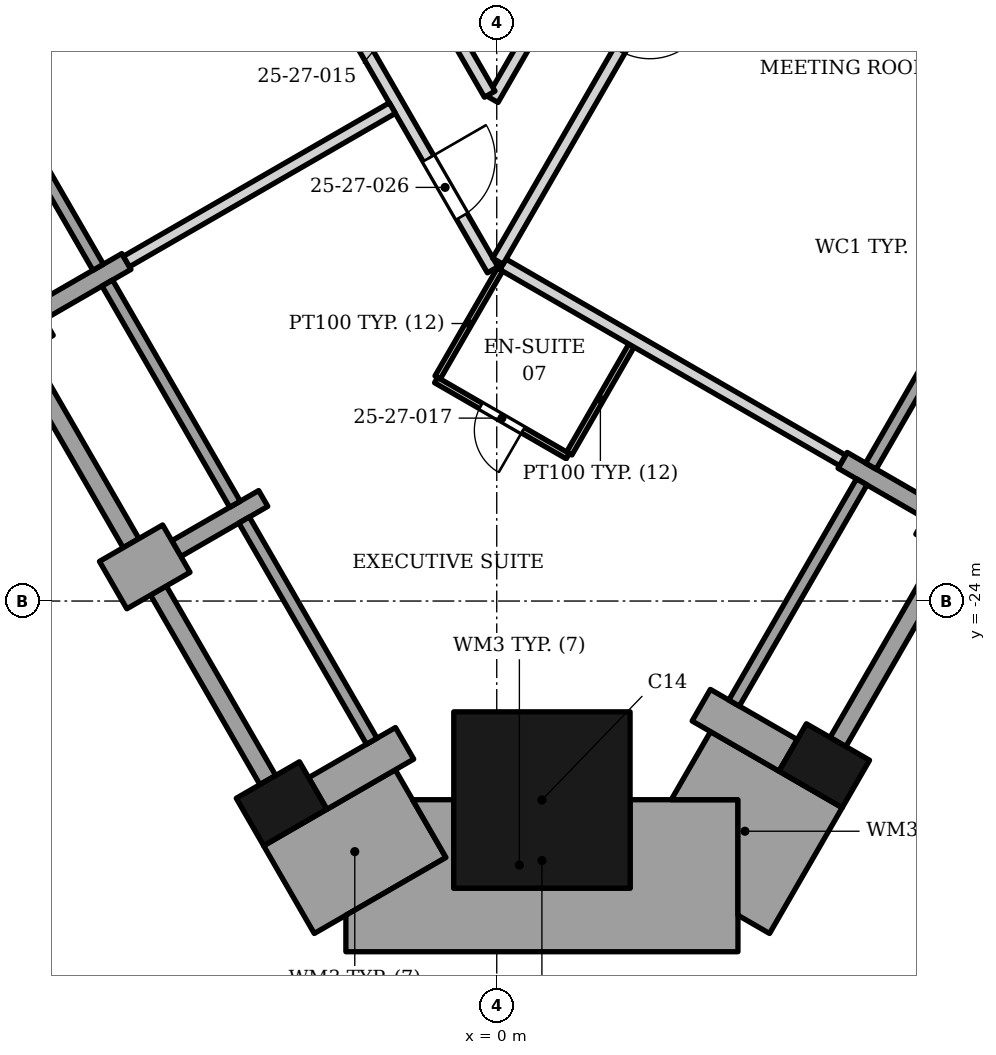
"""IFC4 building model, lengths in metres.
Left out: names, types, materials, properties, quantities, classifications, styles, units other than length and angle.
Written with IfcOpenShell. Run it as: python <this file> out.ifc"""

import sys

from ifc_helpers import new_model, si_unit, direction, frame, frame_2d, origin, origin_2d, place, context, subcontext, project, spatial, polyline, rectangle, outline, extrude, element, fill, save


model = new_model("IFC4")
c1 = context("Model", 3, precision=1e-05, world=origin(), true_north=direction((0.0, 1.0)))
c2 = subcontext(c1, "Body", "Model", "MODEL_VIEW")
j1 = project(units=[si_unit("LENGTHUNIT", "METRE"), si_unit("PLANEANGLEUNIT", "RADIAN")], contexts=[c1])
p1 = place(None, origin())
s1 = spatial("IfcSite", under=j1, at=p1, CompositionType="ELEMENT")
p2 = place(p1, origin())
s2 = spatial("IfcBuilding", under=s1, at=p2, CompositionType="ELEMENT")
p3 = place(p2, frame((0.0, 0.0, 112.2)))
s3 = spatial("IfcBuildingStorey", under=s2, at=p3, CompositionType="ELEMENT", Elevation=112.2)
p4 = place(p3, frame((0.743, -27.272, 0.0), z_axis=(0.0, 0.0, 1.0), x_axis=(0.0, 1.0, 0.0)))
e1 = element("IfcColumn", 1, at=p4, inside=s3, PredefinedType="COLUMN", context=c2, shape_type="SweptSolid", body=[
    extrude(rectangle(XDim=2.9, YDim=2.9, at=origin_2d()), origin(), (0.0, 0.0, 1.0), 3.4),
])
for number, where, z_axis, x_axis in (
    (2, (-8.039, -19.541, 0.0), (0.0, 0.0, 1.0), (0.5, -0.866, 0.0)),
    (3, (-3.539, -27.333, 0.0), (0.0, 0.0, 1.0), (0.5, -0.866, 0.0)),
    (4, (5.387, -26.708, 0.0), (0.0, 0.0, 1.0), (0.5, 0.866, 0.0)),
):
    element("IfcColumn", number, at=place(p3, frame(where, z_axis=z_axis, x_axis=x_axis)), inside=s3, PredefinedType="COLUMN", context=c2, shape_type="SweptSolid", body=[
        extrude(rectangle(XDim=0.9, YDim=1.2, at=origin_2d()), origin(), (0.0, 0.0, 1.0), 3.4),
    ])
p5 = place(p3, frame((-7.52, -19.241, 0.0), z_axis=(0.0, 0.0, 1.0), x_axis=(0.865976140824, 0.500085316245, 0.0)))
e5 = element("IfcWall", 5, at=p5, inside=s3, PredefinedType="SOLIDWALL", context=c2, shape_type="SweptSolid", body=[
    extrude(rectangle(XDim=1.65, YDim=0.3, at=frame_2d((0.825, 0.0))), origin(), (0.0, 0.0, 1.0), 2.65),
])
p6 = place(p3, frame((-6.309, -23.738, 0.0), z_axis=(0.0, 0.0, 1.0), x_axis=(0.865955154139, 0.50012165622, 0.0)))
e6 = element("IfcWall", 6, at=p6, inside=s3, PredefinedType="SOLIDWALL", context=c2, shape_type="SweptSolid", body=[
    extrude(rectangle(XDim=1.2, YDim=0.9, at=frame_2d((0.6, 0.0))), origin(), (0.0, 0.0, 1.0), 2.63),
])
p7 = place(p3, frame((-5.27, -23.138, 0.0), z_axis=(0.0, 0.0, 1.0), x_axis=(0.866040211805, 0.499974350878, 0.0)))
e7 = element("IfcWall", 7, at=p7, inside=s3, PredefinedType="SOLIDWALL", context=c2, shape_type="SweptSolid", body=[
    extrude(rectangle(XDim=1.65, YDim=0.3, at=frame_2d((0.825, 0.0))), origin(), (0.0, 0.0, 1.0), 2.628),
])
p8 = place(p3, frame((-1.515, -26.34, 0.0), z_axis=(0.0, 0.0, 1.0), x_axis=(-0.866040211805, -0.499974350878, 0.0)))
e8 = element("IfcWall", 8, at=p8, inside=s3, PredefinedType="SOLIDWALL", context=c2, shape_type="SweptSolid", body=[
    extrude(rectangle(XDim=1.65, YDim=0.6, at=frame_2d((0.825, 0.0))), origin(), (0.0, 0.0, 1.0), 2.45),
])
p9 = place(p3, frame((-8.655, -14.874, 0.0), z_axis=(0.0, 0.0, 1.0), x_axis=(0.500002543286, -0.866023935413, 0.0)))
e9 = element("IfcWall", 9, at=p9, inside=s3, PredefinedType="ELEMENTEDWALL", context=c2, shape_type="SweptSolid", body=[
    extrude(rectangle(XDim=4.2, YDim=0.2, at=frame_2d((2.1, 0.0))), origin(), (0.0, 0.0, 1.0), 2.65),
])
p10 = place(p3, frame((-7.814, -19.931, 0.0), z_axis=(0.0, 0.0, 1.0), x_axis=(0.500012057535, -0.866018442252, 0.0)))
e10 = element("IfcWall", 10, at=p10, inside=s3, PredefinedType="SOLIDWALL", context=c2, shape_type="SweptSolid", body=[
    extrude(rectangle(XDim=3.6, YDim=0.3, at=frame_2d((1.8, 0.0))), origin(), (0.0, 0.0, 1.0), 2.63),
])
p11 = place(p3, frame((-6.405, -18.771, 0.0), z_axis=(0.0, 0.0, 1.0), x_axis=(0.500027713859, -0.866009402589, 0.0)))
e11 = element("IfcWall", 11, at=p11, inside=s3, PredefinedType="ELEMENTEDWALL", context=c2, shape_type="SweptSolid", body=[
    extrude(rectangle(XDim=4.2, YDim=0.2, at=frame_2d((2.1, 0.0))), origin(), (0.0, 0.0, 1.0), 2.628),
])
p12 = place(p3, frame((-3.765, -26.944, 0.0), z_axis=(0.0, 0.0, 1.0), x_axis=(-0.499984792966, 0.866034183392, 0.0)))
e12 = element("IfcWall", 12, at=p12, inside=s3, PredefinedType="SOLIDWALL", context=c2, shape_type="SweptSolid", body=[
    extrude(rectangle(XDim=3.598, YDim=0.3, at=frame_2d((1.799, 0.0))), origin(), (0.0, 0.0, 1.0), 2.45),
])
p13 = place(p3, frame((-4.155, -22.668, 0.0), z_axis=(0.0, 0.0, 1.0), x_axis=(0.500027713859, -0.866009402589, 0.0)))
e13 = element("IfcWall", 13, at=p13, inside=s3, PredefinedType="ELEMENTEDWALL", context=c2, shape_type="SweptSolid", body=[
    extrude(rectangle(XDim=4.2, YDim=0.2, at=frame_2d((2.1, 0.0))), origin(), (0.0, 0.0, 1.0), 2.45),
])
p14 = place(p3, frame((4.792, -26.538, 0.0), z_axis=(0.0, 0.0, 1.0), x_axis=(-0.866040211805, 0.499974350878, 0.0)))
e14 = element("IfcWall", 14, at=p14, inside=s3, PredefinedType="SOLIDWALL", context=c2, shape_type="SweptSolid", body=[
    extrude(rectangle(XDim=1.65, YDim=0.6, at=frame_2d((0.825, 0.0))), origin(), (0.0, 0.0, 1.0), 2.45),
])
p15 = place(p3, frame((8.156, -23.111, 0.0), z_axis=(0.0, 0.0, 1.0), x_axis=(-0.866006032174, 0.500033551112, 0.0)))
e15 = element("IfcWall", 15, at=p15, inside=s3, PredefinedType="SOLIDWALL", context=c2, shape_type="SweptSolid", body=[
    extrude(rectangle(XDim=1.2, YDim=0.9, at=frame_2d((0.6, 0.0))), origin(), (0.0, 0.0, 1.0), 2.63),
])
p16 = place(p3, frame((7.117, -22.511, 0.0), z_axis=(0.0, 0.0, 1.0), x_axis=(-0.866040211805, 0.499974350878, 0.0)))
e16 = element("IfcWall", 16, at=p16, inside=s3, PredefinedType="SOLIDWALL", context=c2, shape_type="SweptSolid", body=[
    extrude(rectangle(XDim=1.65, YDim=0.3, at=frame_2d((0.825, 0.0))), origin(), (0.0, 0.0, 1.0), 2.65),
])
p17 = place(p3, frame((5.612, -26.318, 0.0), z_axis=(0.0, 0.0, 1.0), x_axis=(0.500012057535, 0.866018442252, 0.0)))
e17 = element("IfcWall", 17, at=p17, inside=s3, PredefinedType="SOLIDWALL", context=c2, shape_type="SweptSolid", body=[
    extrude(rectangle(XDim=3.6, YDim=0.3, at=frame_2d((1.8, 0.0))), origin(), (0.0, 0.0, 1.0), 2.63),
])
p18 = place(p3, frame((3.903, -25.678, 0.0), z_axis=(0.0, 0.0, 1.0), x_axis=(0.49998411664, 0.866034573852, 0.0)))
e18 = element("IfcWall", 18, at=p18, inside=s3, PredefinedType="ELEMENTEDWALL", context=c2, shape_type="SweptSolid", body=[
    extrude(rectangle(XDim=4.2, YDim=0.2, at=frame_2d((2.1, 0.0))), origin(), (0.0, 0.0, 1.0), 2.552),
])
p19 = place(p3, frame((6.153, -21.781, 0.0), z_axis=(0.0, 0.0, 1.0), x_axis=(0.499958946799, 0.866049104564, 0.0)))
e19 = element("IfcWall", 19, at=p19, inside=s3, PredefinedType="ELEMENTEDWALL", context=c2, shape_type="SweptSolid", body=[
    extrude(rectangle(XDim=4.2, YDim=0.2, at=frame_2d((2.1, 0.0))), origin(), (0.0, 0.0, 1.0), 2.65),
])
p20 = place(p3, origin())
e20 = element("IfcWall", 20, at=p20, inside=s3, PredefinedType="SOLIDWALL", context=c2, shape_type="SweptSolid", body=[
    extrude(outline(polyline([(-0.836, -28.217), (-1.669, -26.775), (-3.834, -28.025), (-3.001, -29.467), (-0.836, -28.217)])), origin(), (0.0, 0.0, 1.0), 2.63),
])
p21 = place(p3, origin())
e21 = element("IfcWall", 21, at=p21, inside=s3, PredefinedType="SOLIDWALL", context=c2, shape_type="SweptSolid", body=[
    extrude(outline(polyline([(-1.384, -27.267), (-0.836, -28.217), (-2.481, -29.167), (-2.481, -29.767), (3.967, -29.767), (3.967, -27.267), (2.193, -27.267), (2.193, -28.722), (-0.707, -28.722), (-0.707, -27.267), (-1.384, -27.267)])), origin(), (0.0, 0.0, 1.0), 2.63),
])
p22 = place(p3, origin())
e22 = element("IfcWall", 22, at=p22, inside=s3, PredefinedType="SOLIDWALL", context=c2, shape_type="SweptSolid", body=[
    extrude(outline(polyline([(5.681, -27.398), (3.516, -26.148), (2.87, -27.267), (3.967, -27.267), (3.967, -29.167), (4.487, -29.467), (5.681, -27.398)])), origin(), (0.0, 0.0, 1.0), 2.552),
])
p23 = place(p3, frame((1.193, -21.573, 0.0), z_axis=(0.0, 0.0, 1.0), x_axis=(0.499354689006, 0.866397653833, 0.0)))
e23 = element("IfcWall", 23, at=p23, inside=s3, PredefinedType="PARTITIONING", context=c2, shape_type="SweptSolid", body=[
    extrude(rectangle(XDim=2.05, YDim=0.1, at=frame_2d((1.025, 0.0))), origin(), (0.0, 0.0, 1.0), 3.23),
])
p24 = place(p3, frame((-0.997, -20.367, 0.0), z_axis=(0.0, 0.0, 1.0), x_axis=(0.866022959057, -0.500004234368, 0.0)))
e24 = element("IfcWall", 24, at=p24, inside=s3, PredefinedType="PARTITIONING", context=c2, shape_type="SweptSolid", body=[
    extrude(rectangle(XDim=2.5, YDim=0.1, at=frame_2d((1.25, 0.0))), origin(), (0.0, 0.0, 1.0), 2.552),
])
p25 = place(p24, frame((0.85, 0.0, 0.0)))
e25 = element("IfcOpeningElement", 25, at=p25, cuts=e24, PredefinedType="OPENING", context=c2, shape_type="SweptSolid", body=[
    extrude(rectangle(XDim=0.8, YDim=2.1, at=frame_2d((0.4, 1.05))), frame((0.0, 0.06, 0.0), z_axis=(0.0, -1.0, 0.0), x_axis=(1.0, 0.0, 0.0)), (0.0, 0.0, 1.0), 0.12),
])
p26 = place(p3, frame((-12.882, 3.644, 0.0), z_axis=(0.0, 0.0, 1.0), x_axis=(0.500000325599, -0.866025215799, 0.0)))
e26 = element("IfcWall", 26, at=p26, inside=s3, PredefinedType="PARTITIONING", context=c2, shape_type="SweptSolid", body=[
    extrude(rectangle(XDim=25.63, YDim=0.2, at=frame_2d((12.815, 0.0))), origin(), (0.0, 0.0, 1.0), 2.384),
])
p27 = place(p26, frame((4.0, 0.0, 0.0)))
e27 = element("IfcOpeningElement", 27, at=p27, cuts=e26, PredefinedType="OPENING", context=c2, shape_type="SweptSolid", body=[
    extrude(rectangle(XDim=1.0, YDim=2.1, at=frame_2d((0.5, 1.05))), frame((0.0, 0.11, 0.0), z_axis=(0.0, -1.0, 0.0), x_axis=(1.0, 0.0, 0.0)), (0.0, 0.0, 1.0), 0.22),
])
p28 = place(p26, frame((14.95, 0.0, 0.0)))
e28 = element("IfcOpeningElement", 28, at=p28, cuts=e26, PredefinedType="OPENING", context=c2, shape_type="SweptSolid", body=[
    extrude(rectangle(XDim=1.6, YDim=2.1, at=frame_2d((0.8, 1.05))), frame((0.0, 0.11, 0.0), z_axis=(0.0, -1.0, 0.0), x_axis=(1.0, 0.0, 0.0)), (0.0, 0.0, 1.0), 0.22),
])
p29 = place(p26, frame((23.515, 0.0, 0.0)))
e29 = element("IfcOpeningElement", 29, at=p29, cuts=e26, PredefinedType="OPENING", context=c2, shape_type="SweptSolid", body=[
    extrude(rectangle(XDim=1.1, YDim=2.1, at=frame_2d((0.55, 1.05))), frame((0.0, 0.11, 0.0), z_axis=(0.0, -1.0, 0.0), x_axis=(1.0, 0.0, 0.0)), (0.0, 0.0, 1.0), 0.22),
])
p30 = place(p3, frame((-0.972, -20.323, 0.0), z_axis=(0.0, 0.0, 1.0), x_axis=(0.500646589026, 0.865651773461, 0.0)))
e30 = element("IfcWall", 30, at=p30, inside=s3, PredefinedType="PARTITIONING", context=c2, shape_type="SweptSolid", body=[
    extrude(rectangle(XDim=2.05, YDim=0.1, at=frame_2d((1.025, 0.0))), origin(), (0.0, 0.0, 1.0), 2.552),
])
p31 = place(p3, frame((0.102, -18.463, 0.0), z_axis=(0.0, 0.0, 1.0), x_axis=(0.866035557451, -0.499982412921, 0.0)))
e31 = element("IfcWall", 31, at=p31, inside=s3, PredefinedType="PARTITIONING", context=c2, shape_type="SweptSolid", body=[
    extrude(rectangle(XDim=6.449, YDim=0.2, at=frame_2d((3.225, 0.0))), origin(), (0.0, 0.0, 1.0), 2.552),
])
p32 = place(p3, frame((-6.09, -18.416, 0.0), z_axis=(0.0, 0.0, 1.0), x_axis=(0.866164656326, 0.49975872992, 0.0)))
e32 = element("IfcWall", 32, at=p32, inside=s3, PredefinedType="PARTITIONING", context=c2, shape_type="SweptSolid", body=[
    extrude(rectangle(XDim=5.049, YDim=0.2, at=frame_2d((2.525, 0.0))), origin(), (0.0, 0.0, 1.0), 2.628),
])
p33 = place(p3, frame((-0.065, -15.751, 0.0), z_axis=(0.0, 0.0, 1.0), x_axis=(0.499524753178, 0.866299613854, 0.0)))
e33 = element("IfcWall", 33, at=p33, inside=s3, PredefinedType="PARTITIONING", context=c2, shape_type="SweptSolid", body=[
    extrude(rectangle(XDim=12.83, YDim=0.2, at=frame_2d((6.415, 0.0))), origin(), (0.0, 0.0, 1.0), 2.374),
])
p34 = place(p33, frame((7.556, 0.0, 0.0)))
e34 = element("IfcOpeningElement", 34, at=p34, cuts=e33, PredefinedType="OPENING", context=c2, shape_type="SweptSolid", body=[
    extrude(rectangle(XDim=1.0, YDim=2.1, at=frame_2d((0.5, 1.05))), frame((0.0, 0.11, 0.0), z_axis=(0.0, -1.0, 0.0), x_axis=(1.0, 0.0, 0.0)), (0.0, 0.0, 1.0), 0.22),
])
p35 = place(p3, frame((-2.311, -11.861, 0.0), z_axis=(0.0, 0.0, 1.0), x_axis=(0.499977492351, -0.866038398192, 0.0)))
e35 = element("IfcWall", 35, at=p35, inside=s3, PredefinedType="PARTITIONING", context=c2, shape_type="SweptSolid", body=[
    extrude(rectangle(XDim=4.392, YDim=0.2, at=frame_2d((2.196, 0.0))), origin(), (0.0, 0.0, 1.0), 2.45),
])
p36 = place(p35, frame((1.844, 0.0, 0.0)))
e36 = element("IfcOpeningElement", 36, at=p36, cuts=e35, PredefinedType="OPENING", context=c2, shape_type="SweptSolid", body=[
    extrude(rectangle(XDim=1.0, YDim=2.1, at=frame_2d((0.5, 1.05))), frame((0.0, 0.11, 0.0), z_axis=(0.0, -1.0, 0.0), x_axis=(1.0, 0.0, 0.0)), (0.0, 0.0, 1.0), 0.22),
])
p37 = place(p3, frame((0.018, -18.412, 0.0), z_axis=(0.0, 0.0, 1.0), x_axis=(0.49999953585, 0.866025671762, 0.0)))
e37 = element("IfcWall", 37, at=p37, inside=s3, PredefinedType="PARTITIONING", context=c2, shape_type="SweptSolid", body=[
    extrude(rectangle(XDim=22.5, YDim=0.2, at=frame_2d((11.25, 0.0))), origin(), (0.0, 0.0, 1.0), 2.374),
])
p38 = place(p37, frame((4.0, 0.0, 0.0)))
e38 = element("IfcOpeningElement", 38, at=p38, cuts=e37, PredefinedType="OPENING", context=c2, shape_type="SweptSolid", body=[
    extrude(rectangle(XDim=1.0, YDim=2.1, at=frame_2d((0.5, 1.05))), frame((0.0, 0.11, 0.0), z_axis=(0.0, -1.0, 0.0), x_axis=(1.0, 0.0, 0.0)), (0.0, 0.0, 1.0), 0.22),
])
p39 = place(p37, frame((9.5, 0.0, 0.0)))
e39 = element("IfcOpeningElement", 39, at=p39, cuts=e37, PredefinedType="OPENING", context=c2, shape_type="SweptSolid", body=[
    extrude(rectangle(XDim=1.1, YDim=2.1, at=frame_2d((0.55, 1.05))), frame((0.0, 0.11, 0.0), z_axis=(0.0, -1.0, 0.0), x_axis=(1.0, 0.0, 0.0)), (0.0, 0.0, 1.0), 0.22),
])
p40 = place(p37, frame((16.3, 0.0, 0.0)))
e40 = element("IfcOpeningElement", 40, at=p40, cuts=e37, PredefinedType="OPENING", context=c2, shape_type="SweptSolid", body=[
    extrude(rectangle(XDim=1.0, YDim=2.1, at=frame_2d((0.5, 1.05))), frame((0.0, 0.11, 0.0), z_axis=(0.0, -1.0, 0.0), x_axis=(1.0, 0.0, 0.0)), (0.0, 0.0, 1.0), 0.22),
])
p41 = place(p37, frame((18.7, 0.0, 0.0)))
e41 = element("IfcOpeningElement", 41, at=p41, cuts=e37, PredefinedType="OPENING", context=c2, shape_type="SweptSolid", body=[
    extrude(rectangle(XDim=1.0, YDim=2.1, at=frame_2d((0.5, 1.05))), frame((0.0, 0.11, 0.0), z_axis=(0.0, -1.0, 0.0), x_axis=(1.0, 0.0, 0.0)), (0.0, 0.0, 1.0), 0.22),
])
p42 = place(p25, origin())
e42 = element("IfcDoor", 42, at=p42, inside=s3, OperationType="SINGLE_SWING_RIGHT", PredefinedType="DOOR", context=c2, shape_type="SweptSolid", body=[
    extrude(rectangle(XDim=0.8, YDim=2.1, at=frame_2d((0.4, 1.05))), frame((0.0, 0.025, 0.0), z_axis=(0.0, -1.0, 0.0), x_axis=(1.0, 0.0, 0.0)), (0.0, 0.0, 1.0), 0.05),
])
fill(e25, e42)
p43 = place(p29, origin())
e43 = element("IfcDoor", 43, at=p43, inside=s3, OperationType="SINGLE_SWING_LEFT", PredefinedType="DOOR", context=c2, shape_type="SweptSolid", body=[
    extrude(rectangle(XDim=1.1, YDim=2.1, at=frame_2d((0.55, 1.05))), frame((0.0, 0.025, 0.0), z_axis=(0.0, -1.0, 0.0), x_axis=(1.0, 0.0, 0.0)), (0.0, 0.0, 1.0), 0.05),
])
fill(e29, e43)
save(model, sys.argv[1])
